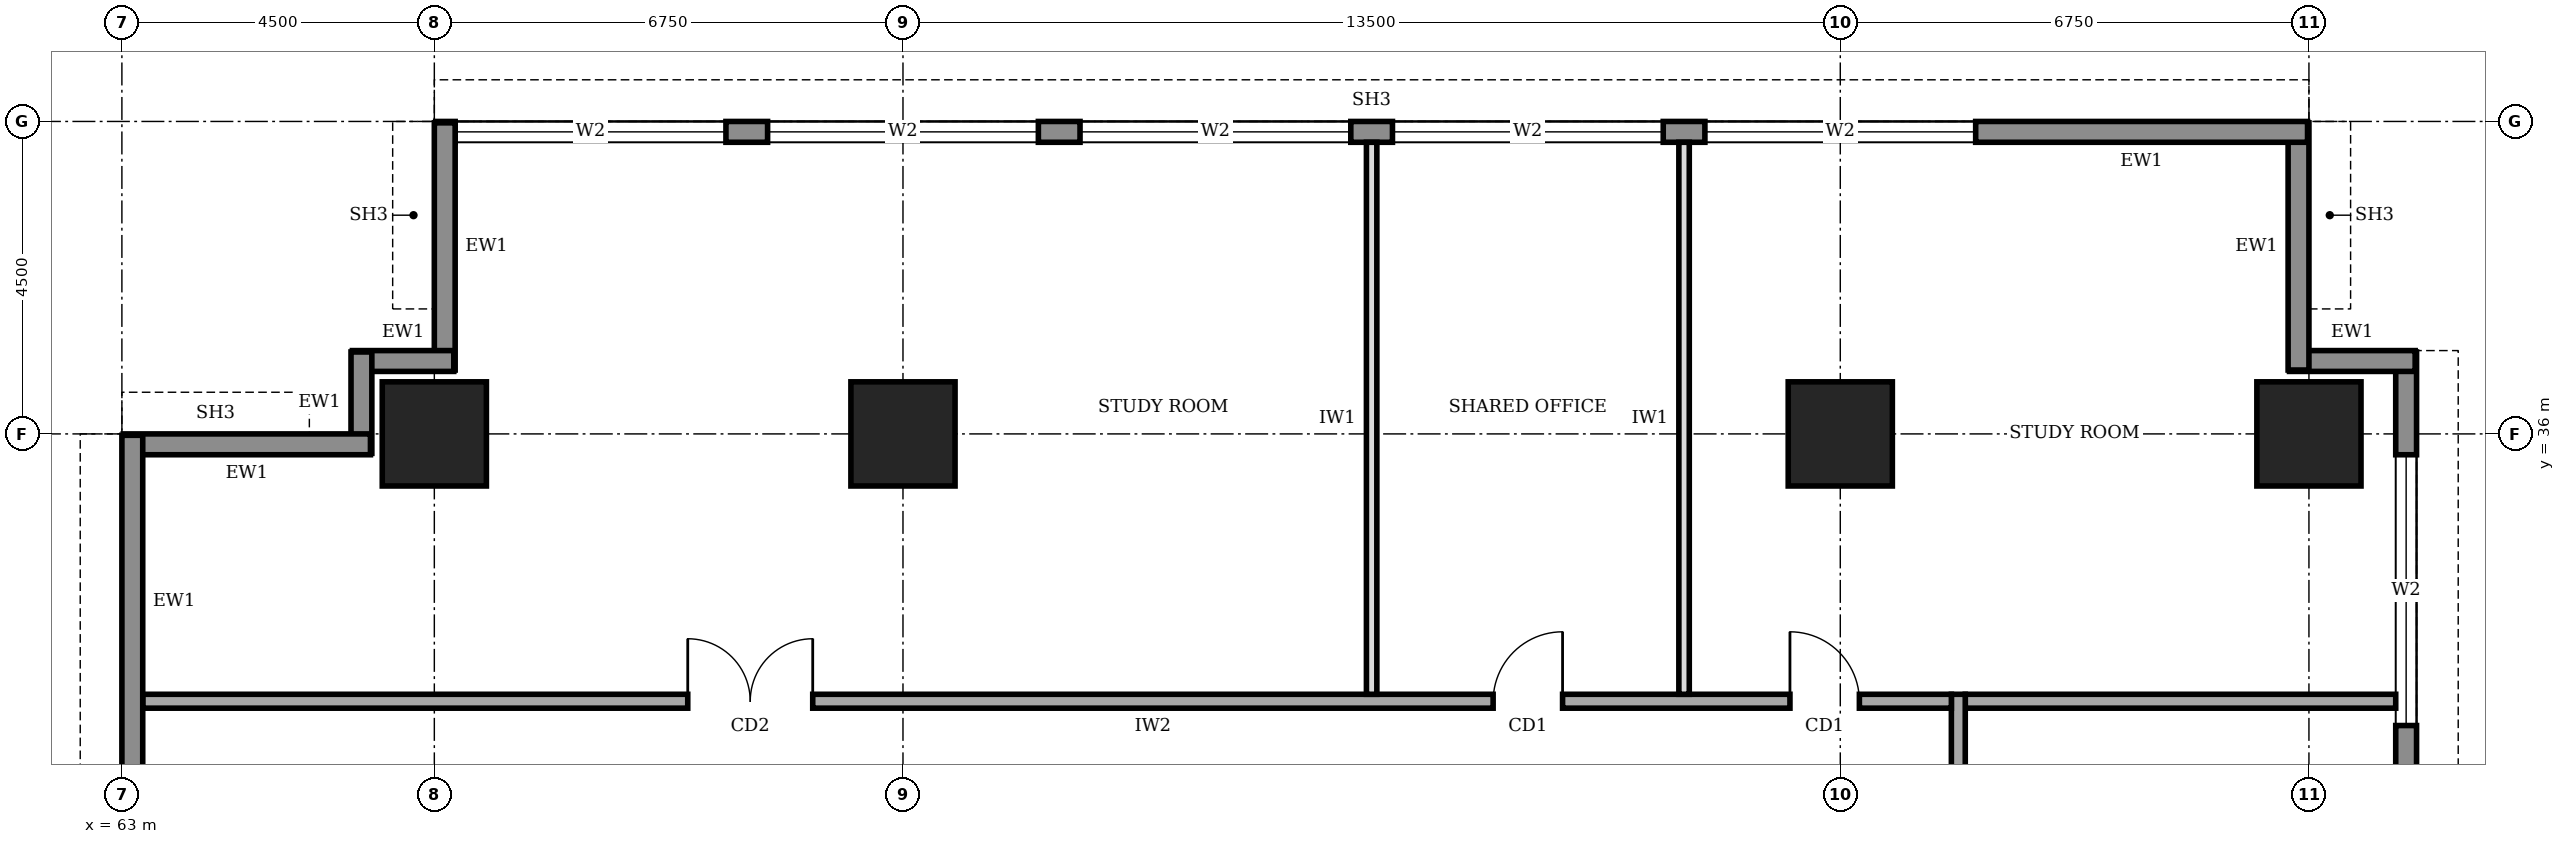
"""IFC4 building model, lengths in metres.
Left out: names, types, materials, properties, quantities, classifications, styles, units other than length and angle.
Written with IfcOpenShell. Run it as: python <this file> out.ifc"""

import sys

from ifc_helpers import new_model, si_unit, direction, frame, frame_2d, origin, origin_2d, place, context, subcontext, project, spatial, rectangle, extrude, element, fill, save


model = new_model("IFC4")
c1 = context("Model", 3, precision=1e-05, world=origin(), true_north=direction((0.0, 1.0)))
c2 = subcontext(c1, "Body", "Model", "MODEL_VIEW")
j1 = project(units=[si_unit("LENGTHUNIT", "METRE"), si_unit("PLANEANGLEUNIT", "RADIAN")], contexts=[c1])
p1 = place(None, origin())
s1 = spatial("IfcSite", under=j1, at=p1, CompositionType="ELEMENT")
p2 = place(p1, origin())
s2 = spatial("IfcBuilding", under=s1, at=p2, CompositionType="ELEMENT")
p3 = place(p2, frame((0.0, 0.0, 149.0)))
s3 = spatial("IfcBuildingStorey", under=s2, at=p3, CompositionType="ELEMENT", Elevation=149.0)
for number, where, z_axis, x_axis in (
    (1, (67.5, 36.0, 0.0), (0.0, 0.0, 1.0), (1.0, 0.0, 0.0)),
    (2, (74.25, 36.0, 0.0), (0.0, 0.0, 1.0), (1.0, 0.0, 0.0)),
    (3, (87.75, 36.0, 0.0), (0.0, 0.0, 1.0), (1.0, 0.0, 0.0)),
    (4, (94.5, 36.0, 0.0), (0.0, 0.0, 1.0), (1.0, 0.0, 0.0)),
):
    element("IfcColumn", number, at=place(p3, frame(where, z_axis=z_axis, x_axis=x_axis)), inside=s3, PredefinedType="COLUMN", context=c2, shape_type="SweptSolid", body=[
        extrude(rectangle(XDim=1.5, YDim=1.5, at=origin_2d()), origin(), (0.0, 0.0, 1.0), 4.0),
    ])
p4 = place(p3, frame((95.9, 3.32, 0.0), z_axis=(0.0, 0.0, 1.0), x_axis=(0.0, 1.0, 0.0)))
e5 = element("IfcWall", 5, at=p4, inside=s3, PredefinedType="STANDARD", context=c2, shape_type="SweptSolid", body=[
    extrude(rectangle(XDim=33.86, YDim=0.3, at=frame_2d((16.93, 0.0))), origin(), (0.0, 0.0, 1.0), 3.75),
])
p5 = place(p4, frame((1.48, 0.0, 0.6)))
e6 = element("IfcOpeningElement", 6, at=p5, cuts=e5, PredefinedType="OPENING", context=c2, shape_type="SweptSolid", body=[
    extrude(rectangle(XDim=3.9, YDim=2.6, at=frame_2d((1.95, 1.3))), frame((0.0, 0.16, 0.0), z_axis=(0.0, -1.0, 0.0), x_axis=(1.0, 0.0, 0.0)), (0.0, 0.0, 1.0), 0.32),
])
p6 = place(p4, frame((5.98, 0.0, 0.6)))
e7 = element("IfcOpeningElement", 7, at=p6, cuts=e5, PredefinedType="OPENING", context=c2, shape_type="SweptSolid", body=[
    extrude(rectangle(XDim=3.9, YDim=2.6, at=frame_2d((1.95, 1.3))), frame((0.0, 0.16, 0.0), z_axis=(0.0, -1.0, 0.0), x_axis=(1.0, 0.0, 0.0)), (0.0, 0.0, 1.0), 0.32),
])
p7 = place(p4, frame((10.48, 0.0, 0.6)))
e8 = element("IfcOpeningElement", 8, at=p7, cuts=e5, PredefinedType="OPENING", context=c2, shape_type="SweptSolid", body=[
    extrude(rectangle(XDim=3.9, YDim=2.6, at=frame_2d((1.95, 1.3))), frame((0.0, 0.16, 0.0), z_axis=(0.0, -1.0, 0.0), x_axis=(1.0, 0.0, 0.0)), (0.0, 0.0, 1.0), 0.32),
])
p8 = place(p4, frame((14.98, 0.0, 0.6)))
e9 = element("IfcOpeningElement", 9, at=p8, cuts=e5, PredefinedType="OPENING", context=c2, shape_type="SweptSolid", body=[
    extrude(rectangle(XDim=3.9, YDim=2.6, at=frame_2d((1.95, 1.3))), frame((0.0, 0.16, 0.0), z_axis=(0.0, -1.0, 0.0), x_axis=(1.0, 0.0, 0.0)), (0.0, 0.0, 1.0), 0.32),
])
p9 = place(p4, frame((19.48, 0.0, 0.6)))
e10 = element("IfcOpeningElement", 10, at=p9, cuts=e5, PredefinedType="OPENING", context=c2, shape_type="SweptSolid", body=[
    extrude(rectangle(XDim=3.9, YDim=2.6, at=frame_2d((1.95, 1.3))), frame((0.0, 0.16, 0.0), z_axis=(0.0, -1.0, 0.0), x_axis=(1.0, 0.0, 0.0)), (0.0, 0.0, 1.0), 0.32),
])
p10 = place(p4, frame((23.98, 0.0, 0.6)))
e11 = element("IfcOpeningElement", 11, at=p10, cuts=e5, PredefinedType="OPENING", context=c2, shape_type="SweptSolid", body=[
    extrude(rectangle(XDim=3.9, YDim=2.6, at=frame_2d((1.95, 1.3))), frame((0.0, 0.16, 0.0), z_axis=(0.0, -1.0, 0.0), x_axis=(1.0, 0.0, 0.0)), (0.0, 0.0, 1.0), 0.32),
])
p11 = place(p4, frame((28.48, 0.0, 0.6)))
e12 = element("IfcOpeningElement", 12, at=p11, cuts=e5, PredefinedType="OPENING", context=c2, shape_type="SweptSolid", body=[
    extrude(rectangle(XDim=3.9, YDim=2.6, at=frame_2d((1.95, 1.3))), frame((0.0, 0.16, 0.0), z_axis=(0.0, -1.0, 0.0), x_axis=(1.0, 0.0, 0.0)), (0.0, 0.0, 1.0), 0.32),
])
p12 = place(p3, frame((96.03, 37.05, 0.0), z_axis=(0.0, 0.0, 1.0), x_axis=(-1.0, 0.0, 0.0)))
e13 = element("IfcWall", 13, at=p12, inside=s3, PredefinedType="STANDARD", context=c2, shape_type="SweptSolid", body=[
    extrude(rectangle(XDim=1.81, YDim=0.3, at=frame_2d((0.905, 0.0))), origin(), (0.0, 0.0, 1.0), 3.75),
])
p13 = place(p3, frame((94.35, 36.92, 0.0), z_axis=(0.0, 0.0, 1.0), x_axis=(0.0, 1.0, 0.0)))
e14 = element("IfcWall", 14, at=p13, inside=s3, PredefinedType="STANDARD", context=c2, shape_type="SweptSolid", body=[
    extrude(rectangle(XDim=3.56, YDim=0.3, at=frame_2d((1.78, 0.0))), origin(), (0.0, 0.0, 1.0), 2.85),
])
p14 = place(p3, frame((94.48, 40.35, 0.0), z_axis=(0.0, 0.0, 1.0), x_axis=(-1.0, 0.0, 0.0)))
e15 = element("IfcWall", 15, at=p14, inside=s3, PredefinedType="STANDARD", context=c2, shape_type="SweptSolid", body=[
    extrude(rectangle(XDim=26.96, YDim=0.3, at=frame_2d((13.48, 0.0))), origin(), (0.0, 0.0, 1.0), 3.75),
])
p15 = place(p14, frame((22.78, 0.0, 0.6)))
e16 = element("IfcOpeningElement", 16, at=p15, cuts=e15, PredefinedType="OPENING", context=c2, shape_type="SweptSolid", body=[
    extrude(rectangle(XDim=3.9, YDim=2.6, at=frame_2d((1.95, 1.3))), frame((0.0, 0.16, 0.0), z_axis=(0.0, -1.0, 0.0), x_axis=(1.0, 0.0, 0.0)), (0.0, 0.0, 1.0), 0.32),
])
p16 = place(p14, frame((18.28, 0.0, 0.6)))
e17 = element("IfcOpeningElement", 17, at=p16, cuts=e15, PredefinedType="OPENING", context=c2, shape_type="SweptSolid", body=[
    extrude(rectangle(XDim=3.9, YDim=2.6, at=frame_2d((1.95, 1.3))), frame((0.0, 0.16, 0.0), z_axis=(0.0, -1.0, 0.0), x_axis=(1.0, 0.0, 0.0)), (0.0, 0.0, 1.0), 0.32),
])
p17 = place(p14, frame((13.78, 0.0, 0.6)))
e18 = element("IfcOpeningElement", 18, at=p17, cuts=e15, PredefinedType="OPENING", context=c2, shape_type="SweptSolid", body=[
    extrude(rectangle(XDim=3.9, YDim=2.6, at=frame_2d((1.95, 1.3))), frame((0.0, 0.16, 0.0), z_axis=(0.0, -1.0, 0.0), x_axis=(1.0, 0.0, 0.0)), (0.0, 0.0, 1.0), 0.32),
])
p18 = place(p14, frame((9.28, 0.0, 0.6)))
e19 = element("IfcOpeningElement", 19, at=p18, cuts=e15, PredefinedType="OPENING", context=c2, shape_type="SweptSolid", body=[
    extrude(rectangle(XDim=3.9, YDim=2.6, at=frame_2d((1.95, 1.3))), frame((0.0, 0.16, 0.0), z_axis=(0.0, -1.0, 0.0), x_axis=(1.0, 0.0, 0.0)), (0.0, 0.0, 1.0), 0.32),
])
p19 = place(p14, frame((4.78, 0.0, 0.6)))
e20 = element("IfcOpeningElement", 20, at=p19, cuts=e15, PredefinedType="OPENING", context=c2, shape_type="SweptSolid", body=[
    extrude(rectangle(XDim=3.9, YDim=2.6, at=frame_2d((1.95, 1.3))), frame((0.0, 0.16, 0.0), z_axis=(0.0, -1.0, 0.0), x_axis=(1.0, 0.0, 0.0)), (0.0, 0.0, 1.0), 0.32),
])
p20 = place(p3, frame((67.65, 40.48, 0.0), z_axis=(0.0, 0.0, 1.0), x_axis=(0.0, -1.0, 0.0)))
e21 = element("IfcWall", 21, at=p20, inside=s3, PredefinedType="STANDARD", context=c2, shape_type="SweptSolid", body=[
    extrude(rectangle(XDim=3.56, YDim=0.3, at=frame_2d((1.78, 0.0))), origin(), (0.0, 0.0, 1.0), 2.85),
])
for number, where, z_axis, x_axis in (
    (22, (67.78, 37.05, 0.0), (0.0, 0.0, 1.0), (-1.0, 0.0, 0.0)),
    (23, (66.45, 37.18, 0.0), (0.0, 0.0, 1.0), (0.0, -1.0, 0.0)),
):
    element("IfcWall", number, at=place(p3, frame(where, z_axis=z_axis, x_axis=x_axis)), inside=s3, PredefinedType="STANDARD", context=c2, shape_type="SweptSolid", body=[
        extrude(rectangle(XDim=1.46, YDim=0.3, at=frame_2d((0.73, 0.0))), origin(), (0.0, 0.0, 1.0), 3.75),
    ])
p21 = place(p3, frame((66.58, 35.85, 0.0), z_axis=(0.0, 0.0, 1.0), x_axis=(-1.0, 0.0, 0.0)))
e24 = element("IfcWall", 24, at=p21, inside=s3, PredefinedType="STANDARD", context=c2, shape_type="SweptSolid", body=[
    extrude(rectangle(XDim=3.56, YDim=0.3, at=frame_2d((1.78, 0.0))), origin(), (0.0, 0.0, 1.0), 2.85),
])
p22 = place(p3, frame((63.15, 35.98, 0.0), z_axis=(0.0, 0.0, 1.0), x_axis=(0.0, -1.0, 0.0)))
e25 = element("IfcWall", 25, at=p22, inside=s3, PredefinedType="STANDARD", context=c2, shape_type="SweptSolid", body=[
    extrude(rectangle(XDim=31.46, YDim=0.3, at=frame_2d((15.73, 0.0))), origin(), (0.0, 0.0, 1.0), 3.75),
])
p23 = place(p22, frame((27.28, 0.0, 0.6)))
e26 = element("IfcOpeningElement", 26, at=p23, cuts=e25, PredefinedType="OPENING", context=c2, shape_type="SweptSolid", body=[
    extrude(rectangle(XDim=3.9, YDim=2.6, at=frame_2d((1.95, 1.3))), frame((0.0, 0.16, 0.0), z_axis=(0.0, -1.0, 0.0), x_axis=(1.0, 0.0, 0.0)), (0.0, 0.0, 1.0), 0.32),
])
p24 = place(p22, frame((22.78, 0.0, 0.6)))
e27 = element("IfcOpeningElement", 27, at=p24, cuts=e25, PredefinedType="OPENING", context=c2, shape_type="SweptSolid", body=[
    extrude(rectangle(XDim=3.9, YDim=2.6, at=frame_2d((1.95, 1.3))), frame((0.0, 0.16, 0.0), z_axis=(0.0, -1.0, 0.0), x_axis=(1.0, 0.0, 0.0)), (0.0, 0.0, 1.0), 0.32),
])
p25 = place(p22, frame((18.28, 0.0, 0.6)))
e28 = element("IfcOpeningElement", 28, at=p25, cuts=e25, PredefinedType="OPENING", context=c2, shape_type="SweptSolid", body=[
    extrude(rectangle(XDim=3.9, YDim=2.6, at=frame_2d((1.95, 1.3))), frame((0.0, 0.16, 0.0), z_axis=(0.0, -1.0, 0.0), x_axis=(1.0, 0.0, 0.0)), (0.0, 0.0, 1.0), 0.32),
])
p26 = place(p22, frame((13.78, 0.0, 0.6)))
e29 = element("IfcOpeningElement", 29, at=p26, cuts=e25, PredefinedType="OPENING", context=c2, shape_type="SweptSolid", body=[
    extrude(rectangle(XDim=3.9, YDim=2.6, at=frame_2d((1.95, 1.3))), frame((0.0, 0.16, 0.0), z_axis=(0.0, -1.0, 0.0), x_axis=(1.0, 0.0, 0.0)), (0.0, 0.0, 1.0), 0.32),
])
p27 = place(p22, frame((9.28, 0.0, 0.6)))
e30 = element("IfcOpeningElement", 30, at=p27, cuts=e25, PredefinedType="OPENING", context=c2, shape_type="SweptSolid", body=[
    extrude(rectangle(XDim=3.9, YDim=2.6, at=frame_2d((1.95, 1.3))), frame((0.0, 0.16, 0.0), z_axis=(0.0, -1.0, 0.0), x_axis=(1.0, 0.0, 0.0)), (0.0, 0.0, 1.0), 0.32),
])
p28 = place(p22, frame((4.78, 0.0, 0.6)))
e31 = element("IfcOpeningElement", 31, at=p28, cuts=e25, PredefinedType="OPENING", context=c2, shape_type="SweptSolid", body=[
    extrude(rectangle(XDim=3.9, YDim=2.6, at=frame_2d((1.95, 1.3))), frame((0.0, 0.16, 0.0), z_axis=(0.0, -1.0, 0.0), x_axis=(1.0, 0.0, 0.0)), (0.0, 0.0, 1.0), 0.32),
])
p29 = place(p3, frame((89.45, 8.45, 0.0), z_axis=(0.0, 0.0, 1.0), x_axis=(0.0, 1.0, 0.0)))
e32 = element("IfcWall", 32, at=p29, inside=s3, PredefinedType="SOLIDWALL", context=c2, shape_type="SweptSolid", body=[
    extrude(rectangle(XDim=23.8, YDim=0.2, at=frame_2d((11.9, 0.0))), origin(), (0.0, 0.0, 1.0), 3.75),
])
p30 = place(p29, frame((1.925, 0.0, 0.0)))
e33 = element("IfcOpeningElement", 33, at=p30, cuts=e32, PredefinedType="OPENING", context=c2, shape_type="SweptSolid", body=[
    extrude(rectangle(XDim=1.0, YDim=2.1, at=frame_2d((0.5, 1.05))), frame((0.0, 0.11, 0.0), z_axis=(0.0, -1.0, 0.0), x_axis=(1.0, 0.0, 0.0)), (0.0, 0.0, 1.0), 0.22),
])
p31 = place(p29, frame((5.65, 0.0, 0.0)))
e34 = element("IfcOpeningElement", 34, at=p31, cuts=e32, PredefinedType="OPENING", context=c2, shape_type="SweptSolid", body=[
    extrude(rectangle(XDim=1.0, YDim=2.1, at=frame_2d((0.5, 1.05))), frame((0.0, 0.11, 0.0), z_axis=(0.0, -1.0, 0.0), x_axis=(1.0, 0.0, 0.0)), (0.0, 0.0, 1.0), 0.22),
])
p32 = place(p29, frame((8.75, 0.0, 0.0)))
e35 = element("IfcOpeningElement", 35, at=p32, cuts=e32, PredefinedType="OPENING", context=c2, shape_type="SweptSolid", body=[
    extrude(rectangle(XDim=0.9, YDim=2.1, at=frame_2d((0.45, 1.05))), frame((0.0, 0.11, 0.0), z_axis=(0.0, -1.0, 0.0), x_axis=(1.0, 0.0, 0.0)), (0.0, 0.0, 1.0), 0.22),
])
p33 = place(p29, frame((11.8, 0.0, 0.0)))
e36 = element("IfcOpeningElement", 36, at=p33, cuts=e32, PredefinedType="OPENING", context=c2, shape_type="SweptSolid", body=[
    extrude(rectangle(XDim=0.9, YDim=2.1, at=frame_2d((0.45, 1.05))), frame((0.0, 0.11, 0.0), z_axis=(0.0, -1.0, 0.0), x_axis=(1.0, 0.0, 0.0)), (0.0, 0.0, 1.0), 0.22),
])
p34 = place(p29, frame((16.5, 0.0, 0.0)))
e37 = element("IfcOpeningElement", 37, at=p34, cuts=e32, PredefinedType="OPENING", context=c2, shape_type="SweptSolid", body=[
    extrude(rectangle(XDim=0.9, YDim=2.1, at=frame_2d((0.45, 1.05))), frame((0.0, 0.11, 0.0), z_axis=(0.0, -1.0, 0.0), x_axis=(1.0, 0.0, 0.0)), (0.0, 0.0, 1.0), 0.22),
])
p35 = place(p29, frame((13.85, 0.0, 0.0)))
e38 = element("IfcOpeningElement", 38, at=p35, cuts=e32, PredefinedType="OPENING", context=c2, shape_type="SweptSolid", body=[
    extrude(rectangle(XDim=1.0, YDim=2.1, at=frame_2d((0.5, 1.05))), frame((0.0, 0.11, 0.0), z_axis=(0.0, -1.0, 0.0), x_axis=(1.0, 0.0, 0.0)), (0.0, 0.0, 1.0), 0.22),
])
p36 = place(p29, frame((20.675, 0.0, 0.0)))
e39 = element("IfcOpeningElement", 39, at=p36, cuts=e32, PredefinedType="OPENING", context=c2, shape_type="SweptSolid", body=[
    extrude(rectangle(XDim=1.0, YDim=2.1, at=frame_2d((0.5, 1.05))), frame((0.0, 0.11, 0.0), z_axis=(0.0, -1.0, 0.0), x_axis=(1.0, 0.0, 0.0)), (0.0, 0.0, 1.0), 0.22),
])
p37 = place(p3, frame((89.35, 32.15, 0.0), z_axis=(0.0, 0.0, 1.0), x_axis=(-1.0, 0.0, 0.0)))
e40 = element("IfcWall", 40, at=p37, inside=s3, PredefinedType="SOLIDWALL", context=c2, shape_type="SweptSolid", body=[
    extrude(rectangle(XDim=26.05, YDim=0.2, at=frame_2d((13.025, 0.0))), origin(), (0.0, 0.0, 1.0), 3.75),
])
p38 = place(p37, frame((16.4, 0.0, 0.0)))
e41 = element("IfcOpeningElement", 41, at=p38, cuts=e40, PredefinedType="OPENING", context=c2, shape_type="SweptSolid", body=[
    extrude(rectangle(XDim=1.8, YDim=2.1, at=frame_2d((0.9, 1.05))), frame((0.0, 0.11, 0.0), z_axis=(0.0, -1.0, 0.0), x_axis=(1.0, 0.0, 0.0)), (0.0, 0.0, 1.0), 0.22),
])
p39 = place(p37, frame((5.6, 0.0, 0.0)))
e42 = element("IfcOpeningElement", 42, at=p39, cuts=e40, PredefinedType="OPENING", context=c2, shape_type="SweptSolid", body=[
    extrude(rectangle(XDim=1.0, YDim=2.1, at=frame_2d((0.5, 1.05))), frame((0.0, 0.11, 0.0), z_axis=(0.0, -1.0, 0.0), x_axis=(1.0, 0.0, 0.0)), (0.0, 0.0, 1.0), 0.22),
])
p40 = place(p37, frame((1.325, 0.0, 0.0)))
e43 = element("IfcOpeningElement", 43, at=p40, cuts=e40, PredefinedType="OPENING", context=c2, shape_type="SweptSolid", body=[
    extrude(rectangle(XDim=1.0, YDim=2.1, at=frame_2d((0.5, 1.05))), frame((0.0, 0.11, 0.0), z_axis=(0.0, -1.0, 0.0), x_axis=(1.0, 0.0, 0.0)), (0.0, 0.0, 1.0), 0.22),
])
p41 = place(p3, frame((89.55, 32.15, 0.0), z_axis=(0.0, 0.0, 1.0), x_axis=(1.0, 0.0, 0.0)))
e44 = element("IfcWall", 44, at=p41, inside=s3, PredefinedType="SOLIDWALL", context=c2, shape_type="SweptSolid", body=[
    extrude(rectangle(XDim=6.2, YDim=0.2, at=frame_2d((3.1, 0.0))), origin(), (0.0, 0.0, 1.0), 3.75),
])
for number, where, z_axis, x_axis in (
    (45, (81.0, 32.25, 0.0), (0.0, 0.0, 1.0), (0.0, 1.0, 0.0)),
    (46, (85.5, 32.25, 0.0), (0.0, 0.0, 1.0), (0.0, 1.0, 0.0)),
):
    element("IfcWall", number, at=place(p3, frame(where, z_axis=z_axis, x_axis=x_axis)), inside=s3, PredefinedType="PARTITIONING", context=c2, shape_type="SweptSolid", body=[
        extrude(rectangle(XDim=7.95, YDim=0.15, at=frame_2d((3.975, 0.0))), origin(), (0.0, 0.0, 1.0), 3.75),
    ])
p42 = place(p11, origin())
e47 = element("IfcWindow", 47, at=p42, inside=s3, PartitioningType="SINGLE_PANEL", PredefinedType="WINDOW", context=c2, shape_type="SweptSolid", body=[
    extrude(rectangle(XDim=3.9, YDim=2.6, at=frame_2d((1.95, 1.3))), frame((0.0, 0.03, 0.0), z_axis=(0.0, -1.0, 0.0), x_axis=(1.0, 0.0, 0.0)), (0.0, 0.0, 1.0), 0.06),
])
fill(e12, e47)
p43 = place(p15, origin())
e48 = element("IfcWindow", 48, at=p43, inside=s3, PartitioningType="SINGLE_PANEL", PredefinedType="WINDOW", context=c2, shape_type="SweptSolid", body=[
    extrude(rectangle(XDim=3.9, YDim=2.6, at=frame_2d((1.95, 1.3))), frame((0.0, 0.03, 0.0), z_axis=(0.0, -1.0, 0.0), x_axis=(1.0, 0.0, 0.0)), (0.0, 0.0, 1.0), 0.06),
])
fill(e16, e48)
p44 = place(p16, origin())
e49 = element("IfcWindow", 49, at=p44, inside=s3, PartitioningType="SINGLE_PANEL", PredefinedType="WINDOW", context=c2, shape_type="SweptSolid", body=[
    extrude(rectangle(XDim=3.9, YDim=2.6, at=frame_2d((1.95, 1.3))), frame((0.0, 0.03, 0.0), z_axis=(0.0, -1.0, 0.0), x_axis=(1.0, 0.0, 0.0)), (0.0, 0.0, 1.0), 0.06),
])
fill(e17, e49)
p45 = place(p17, origin())
e50 = element("IfcWindow", 50, at=p45, inside=s3, PartitioningType="SINGLE_PANEL", PredefinedType="WINDOW", context=c2, shape_type="SweptSolid", body=[
    extrude(rectangle(XDim=3.9, YDim=2.6, at=frame_2d((1.95, 1.3))), frame((0.0, 0.03, 0.0), z_axis=(0.0, -1.0, 0.0), x_axis=(1.0, 0.0, 0.0)), (0.0, 0.0, 1.0), 0.06),
])
fill(e18, e50)
p46 = place(p18, origin())
e51 = element("IfcWindow", 51, at=p46, inside=s3, PartitioningType="SINGLE_PANEL", PredefinedType="WINDOW", context=c2, shape_type="SweptSolid", body=[
    extrude(rectangle(XDim=3.9, YDim=2.6, at=frame_2d((1.95, 1.3))), frame((0.0, 0.03, 0.0), z_axis=(0.0, -1.0, 0.0), x_axis=(1.0, 0.0, 0.0)), (0.0, 0.0, 1.0), 0.06),
])
fill(e19, e51)
p47 = place(p19, origin())
e52 = element("IfcWindow", 52, at=p47, inside=s3, PartitioningType="SINGLE_PANEL", PredefinedType="WINDOW", context=c2, shape_type="SweptSolid", body=[
    extrude(rectangle(XDim=3.9, YDim=2.6, at=frame_2d((1.95, 1.3))), frame((0.0, 0.03, 0.0), z_axis=(0.0, -1.0, 0.0), x_axis=(1.0, 0.0, 0.0)), (0.0, 0.0, 1.0), 0.06),
])
fill(e20, e52)
p48 = place(p38, frame((1.8, 0.0, 0.0), z_axis=(0.0, 0.0, 1.0), x_axis=(-1.0, 0.0, 0.0)))
e53 = element("IfcDoor", 53, at=p48, inside=s3, OperationType="DOUBLE_DOOR_SINGLE_SWING", PredefinedType="DOOR", context=c2, shape_type="SweptSolid", body=[
    extrude(rectangle(XDim=1.8, YDim=2.1, at=frame_2d((0.9, 1.05))), frame((0.0, 0.025, 0.0), z_axis=(0.0, -1.0, 0.0), x_axis=(1.0, 0.0, 0.0)), (0.0, 0.0, 1.0), 0.05),
])
fill(e41, e53)
p49 = place(p39, frame((1.0, 0.0, 0.0), z_axis=(0.0, 0.0, 1.0), x_axis=(-1.0, 0.0, 0.0)))
e54 = element("IfcDoor", 54, at=p49, inside=s3, OperationType="SINGLE_SWING_RIGHT", PredefinedType="DOOR", context=c2, shape_type="SweptSolid", body=[
    extrude(rectangle(XDim=1.0, YDim=2.1, at=frame_2d((0.5, 1.05))), frame((0.0, 0.025, 0.0), z_axis=(0.0, -1.0, 0.0), x_axis=(1.0, 0.0, 0.0)), (0.0, 0.0, 1.0), 0.05),
])
fill(e42, e54)
p50 = place(p40, frame((1.0, 0.0, 0.0), z_axis=(0.0, 0.0, 1.0), x_axis=(-1.0, 0.0, 0.0)))
e55 = element("IfcDoor", 55, at=p50, inside=s3, OperationType="SINGLE_SWING_LEFT", PredefinedType="DOOR", context=c2, shape_type="SweptSolid", body=[
    extrude(rectangle(XDim=1.0, YDim=2.1, at=frame_2d((0.5, 1.05))), frame((0.0, 0.025, 0.0), z_axis=(0.0, -1.0, 0.0), x_axis=(1.0, 0.0, 0.0)), (0.0, 0.0, 1.0), 0.05),
])
fill(e43, e55)
save(model, sys.argv[1])
